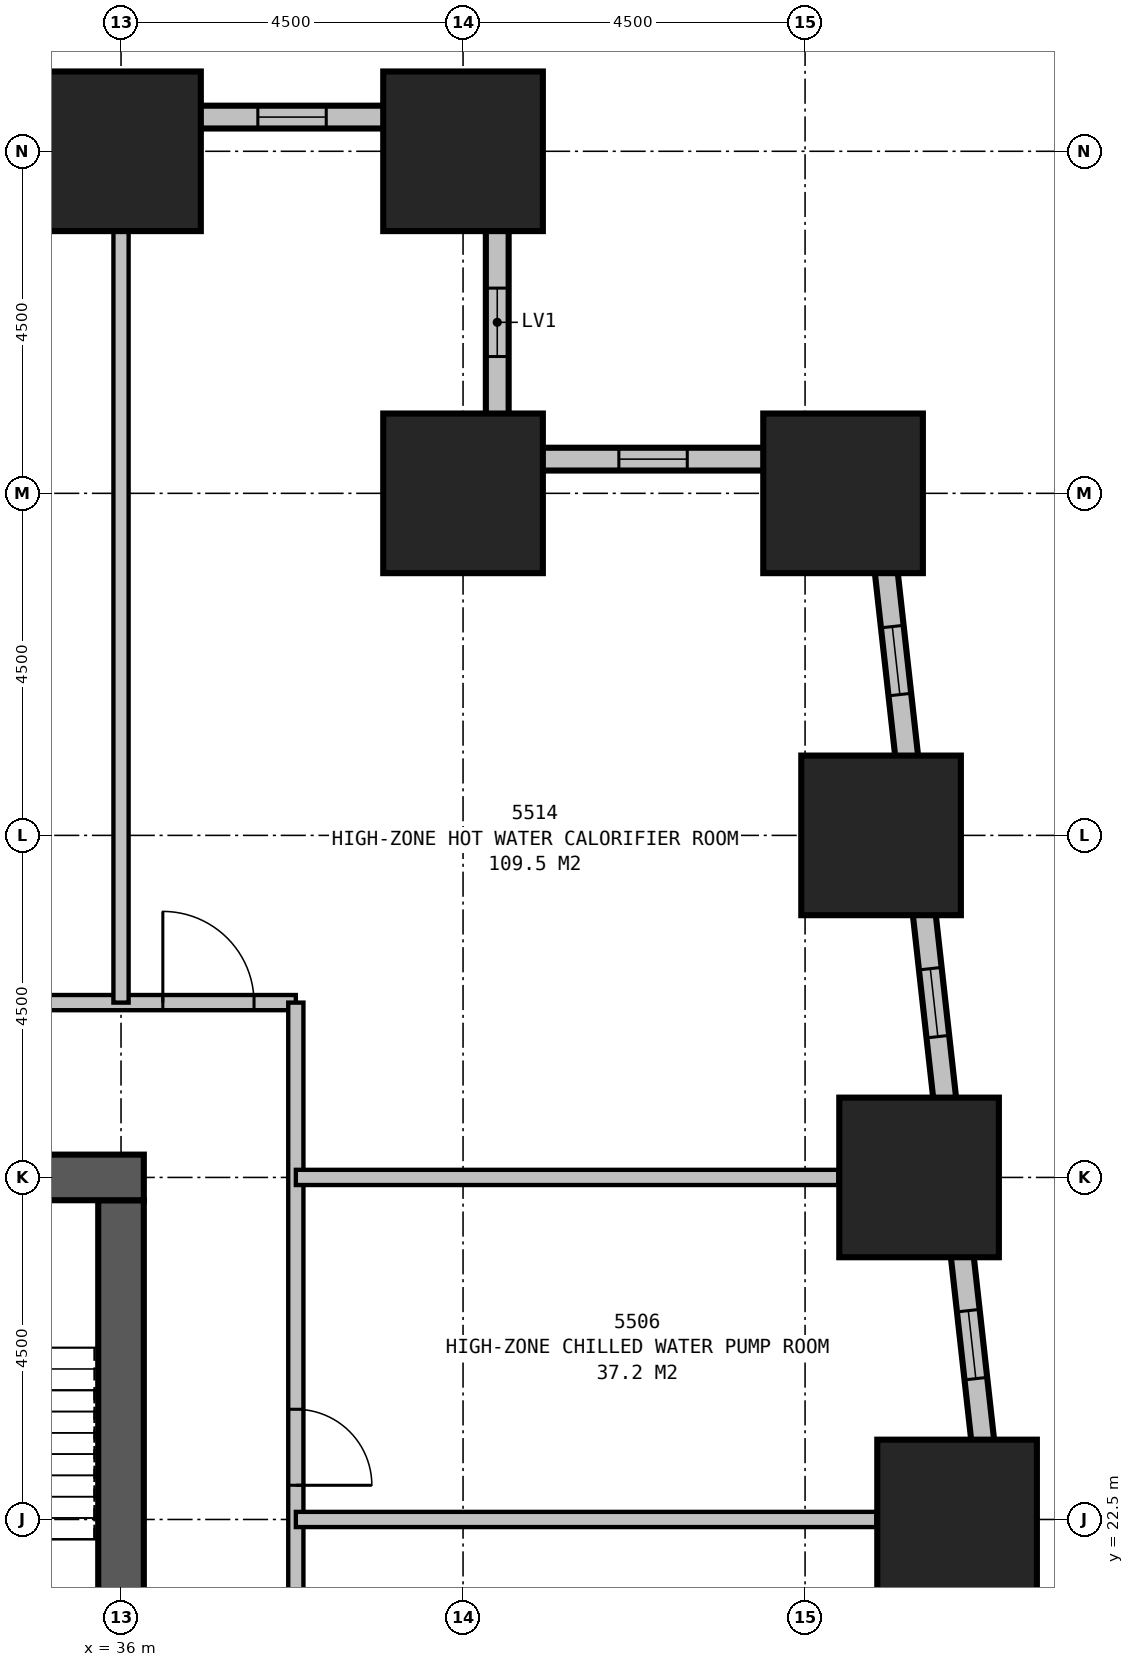
"""IFC4 building model, lengths in metres.
Left out: names, types, materials, properties, quantities, classifications, styles, units other than length and angle.
Written with IfcOpenShell. Run it as: python <this file> out.ifc"""

import sys

from ifc_helpers import new_model, si_unit, direction, frame, frame_2d, origin, origin_2d, place, context, subcontext, project, spatial, rectangle, extrude, element, fill, save


model = new_model("IFC4")
c1 = context("Model", 3, precision=1e-05, world=origin(), true_north=direction((0.0, 1.0)))
c2 = subcontext(c1, "Body", "Model", "MODEL_VIEW")
j1 = project(units=[si_unit("LENGTHUNIT", "METRE"), si_unit("PLANEANGLEUNIT", "RADIAN")], contexts=[c1])
p1 = place(None, origin())
s1 = spatial("IfcSite", under=j1, at=p1, CompositionType="ELEMENT")
p2 = place(p1, origin())
s2 = spatial("IfcBuilding", under=s1, at=p2, CompositionType="ELEMENT")
p3 = place(p2, frame((0.0, 0.0, 211.4)))
s3 = spatial("IfcBuildingStorey", under=s2, at=p3, CompositionType="ELEMENT", Elevation=211.4)
for number, where, z_axis, x_axis in (
    (1, (47.0, 22.5, 0.0), (0.0, 0.0, 1.0), (1.0, 0.0, 0.0)),
    (2, (46.5, 27.0, 0.0), (0.0, 0.0, 1.0), (1.0, 0.0, 0.0)),
    (3, (46.0, 31.5, 0.0), (0.0, 0.0, 1.0), (1.0, 0.0, 0.0)),
    (4, (45.5, 36.0, 0.0), (0.0, 0.0, 1.0), (1.0, 0.0, 0.0)),
    (5, (40.5, 36.0, 0.0), (0.0, 0.0, 1.0), (1.0, 0.0, 0.0)),
    (6, (40.5, 40.5, 0.0), (0.0, 0.0, 1.0), (1.0, 0.0, 0.0)),
    (7, (36.0, 40.5, 0.0), (0.0, 0.0, 1.0), (1.0, 0.0, 0.0)),
):
    element("IfcColumn", number, at=place(p3, frame(where, z_axis=z_axis, x_axis=x_axis)), inside=s3, PredefinedType="COLUMN", context=c2, shape_type="SweptSolid", body=[
        extrude(rectangle(XDim=2.1, YDim=2.1, at=origin_2d()), origin(), (0.0, 0.0, 1.0), 6.0),
    ])
p4 = place(p3, frame((36.3, 27.0, 0.0), z_axis=(0.0, 0.0, 1.0), x_axis=(-1.0, 0.0, 0.0)))
e8 = element("IfcWall", 8, at=p4, inside=s3, PredefinedType="SHEAR", context=c2, shape_type="SweptSolid", body=[
    extrude(rectangle(XDim=23.1, YDim=0.6, at=frame_2d((11.55, 0.0))), origin(), (0.0, 0.0, 1.0), 6.0),
])
p5 = place(p4, frame((17.05, 0.0, 0.0)))
e9 = element("IfcOpeningElement", 9, at=p5, cuts=e8, PredefinedType="OPENING", context=c2, shape_type="SweptSolid", body=[
    extrude(rectangle(XDim=1.0, YDim=2.1, at=frame_2d((0.5, 1.05))), frame((0.0, 0.31, 0.0), z_axis=(0.0, -1.0, 0.0), x_axis=(1.0, 0.0, 0.0)), (0.0, 0.0, 1.0), 0.62),
])
p6 = place(p4, frame((12.05, 0.0, 0.0)))
e10 = element("IfcOpeningElement", 10, at=p6, cuts=e8, PredefinedType="OPENING", context=c2, shape_type="SweptSolid", body=[
    extrude(rectangle(XDim=1.0, YDim=2.1, at=frame_2d((0.5, 1.05))), frame((0.0, 0.31, 0.0), z_axis=(0.0, -1.0, 0.0), x_axis=(1.0, 0.0, 0.0)), (0.0, 0.0, 1.0), 0.62),
])
p7 = place(p4, frame((7.05, 0.0, 0.0)))
e11 = element("IfcOpeningElement", 11, at=p7, cuts=e8, PredefinedType="OPENING", context=c2, shape_type="SweptSolid", body=[
    extrude(rectangle(XDim=1.0, YDim=2.1, at=frame_2d((0.5, 1.05))), frame((0.0, 0.31, 0.0), z_axis=(0.0, -1.0, 0.0), x_axis=(1.0, 0.0, 0.0)), (0.0, 0.0, 1.0), 0.62),
])
p8 = place(p3, frame((36.0, 20.0, 0.0), z_axis=(0.0, 0.0, 1.0), x_axis=(0.0, 1.0, 0.0)))
e12 = element("IfcWall", 12, at=p8, inside=s3, PredefinedType="SHEAR", context=c2, shape_type="SweptSolid", body=[
    extrude(rectangle(XDim=6.7, YDim=0.6, at=frame_2d((3.35, 0.0))), origin(), (0.0, 0.0, 1.0), 6.0),
])
p9 = place(p3, frame((49.519, 3.901, 0.0), z_axis=(0.0, 0.0, 1.0), x_axis=(-0.110429082637, 0.993884006164, 0.0)))
e13 = element("IfcWall", 13, at=p9, inside=s3, PredefinedType="STANDARD", context=c2, shape_type="SweptSolid", body=[
    extrude(rectangle(XDim=32.899, YDim=0.3, at=frame_2d((16.45, 0.0))), origin(), (0.0, 0.0, 1.0), 4.6),
])
p10 = place(p9, frame((2.467, 0.0, 0.5)))
e14 = element("IfcOpeningElement", 14, at=p10, cuts=e13, PredefinedType="OPENING", context=c2, shape_type="SweptSolid", body=[
    extrude(rectangle(XDim=0.9, YDim=1.2, at=frame_2d((0.45, 0.6))), frame((0.0, 0.16, 0.0), z_axis=(0.0, -1.0, 0.0), x_axis=(1.0, 0.0, 0.0)), (0.0, 0.0, 1.0), 0.32),
])
p11 = place(p9, frame((6.995, 0.0, 0.5)))
e15 = element("IfcOpeningElement", 15, at=p11, cuts=e13, PredefinedType="OPENING", context=c2, shape_type="SweptSolid", body=[
    extrude(rectangle(XDim=0.9, YDim=1.2, at=frame_2d((0.45, 0.6))), frame((0.0, 0.16, 0.0), z_axis=(0.0, -1.0, 0.0), x_axis=(1.0, 0.0, 0.0)), (0.0, 0.0, 1.0), 0.32),
])
p12 = place(p9, frame((11.522, 0.0, 0.5)))
e16 = element("IfcOpeningElement", 16, at=p12, cuts=e13, PredefinedType="OPENING", context=c2, shape_type="SweptSolid", body=[
    extrude(rectangle(XDim=0.9, YDim=1.2, at=frame_2d((0.45, 0.6))), frame((0.0, 0.16, 0.0), z_axis=(0.0, -1.0, 0.0), x_axis=(1.0, 0.0, 0.0)), (0.0, 0.0, 1.0), 0.32),
])
p13 = place(p9, frame((16.05, 0.0, 0.5)))
e17 = element("IfcOpeningElement", 17, at=p13, cuts=e13, PredefinedType="OPENING", context=c2, shape_type="SweptSolid", body=[
    extrude(rectangle(XDim=0.9, YDim=1.2, at=frame_2d((0.45, 0.6))), frame((0.0, 0.16, 0.0), z_axis=(0.0, -1.0, 0.0), x_axis=(1.0, 0.0, 0.0)), (0.0, 0.0, 1.0), 0.32),
])
p14 = place(p9, frame((20.578, 0.0, 0.5)))
e18 = element("IfcOpeningElement", 18, at=p14, cuts=e13, PredefinedType="OPENING", context=c2, shape_type="SweptSolid", body=[
    extrude(rectangle(XDim=0.9, YDim=1.2, at=frame_2d((0.45, 0.6))), frame((0.0, 0.16, 0.0), z_axis=(0.0, -1.0, 0.0), x_axis=(1.0, 0.0, 0.0)), (0.0, 0.0, 1.0), 0.32),
])
p15 = place(p9, frame((25.105, 0.0, 0.5)))
e19 = element("IfcOpeningElement", 19, at=p15, cuts=e13, PredefinedType="OPENING", context=c2, shape_type="SweptSolid", body=[
    extrude(rectangle(XDim=0.9, YDim=1.2, at=frame_2d((0.45, 0.6))), frame((0.0, 0.16, 0.0), z_axis=(0.0, -1.0, 0.0), x_axis=(1.0, 0.0, 0.0)), (0.0, 0.0, 1.0), 0.32),
])
p16 = place(p9, frame((29.633, 0.0, 0.5)))
e20 = element("IfcOpeningElement", 20, at=p16, cuts=e13, PredefinedType="OPENING", context=c2, shape_type="SweptSolid", body=[
    extrude(rectangle(XDim=0.9, YDim=1.2, at=frame_2d((0.45, 0.6))), frame((0.0, 0.16, 0.0), z_axis=(0.0, -1.0, 0.0), x_axis=(1.0, 0.0, 0.0)), (0.0, 0.0, 1.0), 0.32),
])
p17 = place(p3, frame((46.053, 36.45, 0.0), z_axis=(0.0, 0.0, 1.0), x_axis=(-1.0, 0.0, 0.0)))
e21 = element("IfcWall", 21, at=p17, inside=s3, PredefinedType="STANDARD", context=c2, shape_type="SweptSolid", body=[
    extrude(rectangle(XDim=5.253, YDim=0.3, at=frame_2d((2.626, 0.0))), origin(), (0.0, 0.0, 1.0), 4.6),
])
p18 = place(p17, frame((2.603, 0.0, 0.5)))
e22 = element("IfcOpeningElement", 22, at=p18, cuts=e21, PredefinedType="OPENING", context=c2, shape_type="SweptSolid", body=[
    extrude(rectangle(XDim=0.9, YDim=1.2, at=frame_2d((0.45, 0.6))), frame((0.0, 0.16, 0.0), z_axis=(0.0, -1.0, 0.0), x_axis=(1.0, 0.0, 0.0)), (0.0, 0.0, 1.0), 0.32),
])
p19 = place(p3, frame((40.95, 36.3, 0.0), z_axis=(0.0, 0.0, 1.0), x_axis=(0.0, 1.0, 0.0)))
e23 = element("IfcWall", 23, at=p19, inside=s3, PredefinedType="STANDARD", context=c2, shape_type="SweptSolid", body=[
    extrude(rectangle(XDim=4.8, YDim=0.3, at=frame_2d((2.4, 0.0))), origin(), (0.0, 0.0, 1.0), 4.6),
])
p20 = place(p19, frame((1.5, 0.0, 0.5)))
e24 = element("IfcOpeningElement", 24, at=p20, cuts=e23, PredefinedType="OPENING", context=c2, shape_type="SweptSolid", body=[
    extrude(rectangle(XDim=0.9, YDim=1.2, at=frame_2d((0.45, 0.6))), frame((0.0, 0.16, 0.0), z_axis=(0.0, -1.0, 0.0), x_axis=(1.0, 0.0, 0.0)), (0.0, 0.0, 1.0), 0.32),
])
p21 = place(p3, frame((41.1, 40.95, 0.0), z_axis=(0.0, 0.0, 1.0), x_axis=(-1.0, 0.0, 0.0)))
e25 = element("IfcWall", 25, at=p21, inside=s3, PredefinedType="STANDARD", context=c2, shape_type="SweptSolid", body=[
    extrude(rectangle(XDim=32.7, YDim=0.3, at=frame_2d((16.35, 0.0))), origin(), (0.0, 0.0, 1.0), 4.6),
])
p22 = place(p21, frame((2.4, 0.0, 0.5)))
e26 = element("IfcOpeningElement", 26, at=p22, cuts=e25, PredefinedType="OPENING", context=c2, shape_type="SweptSolid", body=[
    extrude(rectangle(XDim=0.9, YDim=1.2, at=frame_2d((0.45, 0.6))), frame((0.0, 0.16, 0.0), z_axis=(0.0, -1.0, 0.0), x_axis=(1.0, 0.0, 0.0)), (0.0, 0.0, 1.0), 0.32),
])
p23 = place(p21, frame((6.9, 0.0, 0.5)))
e27 = element("IfcOpeningElement", 27, at=p23, cuts=e25, PredefinedType="OPENING", context=c2, shape_type="SweptSolid", body=[
    extrude(rectangle(XDim=0.9, YDim=1.2, at=frame_2d((0.45, 0.6))), frame((0.0, 0.16, 0.0), z_axis=(0.0, -1.0, 0.0), x_axis=(1.0, 0.0, 0.0)), (0.0, 0.0, 1.0), 0.32),
])
p24 = place(p21, frame((11.4, 0.0, 0.5)))
e28 = element("IfcOpeningElement", 28, at=p24, cuts=e25, PredefinedType="OPENING", context=c2, shape_type="SweptSolid", body=[
    extrude(rectangle(XDim=0.9, YDim=1.2, at=frame_2d((0.45, 0.6))), frame((0.0, 0.16, 0.0), z_axis=(0.0, -1.0, 0.0), x_axis=(1.0, 0.0, 0.0)), (0.0, 0.0, 1.0), 0.32),
])
p25 = place(p21, frame((15.9, 0.0, 0.5)))
e29 = element("IfcOpeningElement", 29, at=p25, cuts=e25, PredefinedType="OPENING", context=c2, shape_type="SweptSolid", body=[
    extrude(rectangle(XDim=0.9, YDim=1.2, at=frame_2d((0.45, 0.6))), frame((0.0, 0.16, 0.0), z_axis=(0.0, -1.0, 0.0), x_axis=(1.0, 0.0, 0.0)), (0.0, 0.0, 1.0), 0.32),
])
p26 = place(p21, frame((20.4, 0.0, 0.5)))
e30 = element("IfcOpeningElement", 30, at=p26, cuts=e25, PredefinedType="OPENING", context=c2, shape_type="SweptSolid", body=[
    extrude(rectangle(XDim=0.9, YDim=1.2, at=frame_2d((0.45, 0.6))), frame((0.0, 0.16, 0.0), z_axis=(0.0, -1.0, 0.0), x_axis=(1.0, 0.0, 0.0)), (0.0, 0.0, 1.0), 0.32),
])
p27 = place(p21, frame((24.9, 0.0, 0.5)))
e31 = element("IfcOpeningElement", 31, at=p27, cuts=e25, PredefinedType="OPENING", context=c2, shape_type="SweptSolid", body=[
    extrude(rectangle(XDim=0.9, YDim=1.2, at=frame_2d((0.45, 0.6))), frame((0.0, 0.16, 0.0), z_axis=(0.0, -1.0, 0.0), x_axis=(1.0, 0.0, 0.0)), (0.0, 0.0, 1.0), 0.32),
])
p28 = place(p21, frame((29.4, 0.0, 0.5)))
e32 = element("IfcOpeningElement", 32, at=p28, cuts=e25, PredefinedType="OPENING", context=c2, shape_type="SweptSolid", body=[
    extrude(rectangle(XDim=0.9, YDim=1.2, at=frame_2d((0.45, 0.6))), frame((0.0, 0.16, 0.0), z_axis=(0.0, -1.0, 0.0), x_axis=(1.0, 0.0, 0.0)), (0.0, 0.0, 1.0), 0.32),
])
p29 = place(p3, frame((38.3, 11.2, 0.0), z_axis=(0.0, 0.0, 1.0), x_axis=(0.0, 1.0, 0.0)))
e33 = element("IfcWall", 33, at=p29, inside=s3, PredefinedType="PARTITIONING", context=c2, shape_type="SweptSolid", body=[
    extrude(rectangle(XDim=18.1, YDim=0.2, at=frame_2d((9.05, 0.0))), origin(), (0.0, 0.0, 1.0), 5.75),
])
p30 = place(p29, frame((3.95, 0.0, 0.0), z_axis=(0.0, 0.0, 1.0), x_axis=(-1.0, 0.0, 0.0)))
e34 = element("IfcOpeningElement", 34, at=p30, cuts=e33, PredefinedType="OPENING", context=c2, shape_type="SweptSolid", body=[
    extrude(rectangle(XDim=1.2, YDim=2.1, at=frame_2d((0.6, 1.05))), frame((0.0, 0.11, 0.0), z_axis=(0.0, -1.0, 0.0), x_axis=(1.0, 0.0, 0.0)), (0.0, 0.0, 1.0), 0.22),
])
p31 = place(p29, frame((12.75, 0.0, 0.0), z_axis=(0.0, 0.0, 1.0), x_axis=(-1.0, 0.0, 0.0)))
e35 = element("IfcOpeningElement", 35, at=p31, cuts=e33, PredefinedType="OPENING", context=c2, shape_type="SweptSolid", body=[
    extrude(rectangle(XDim=1.0, YDim=2.1, at=frame_2d((0.5, 1.05))), frame((0.0, 0.11, 0.0), z_axis=(0.0, -1.0, 0.0), x_axis=(1.0, 0.0, 0.0)), (0.0, 0.0, 1.0), 0.22),
])
p32 = place(p3, frame((11.2, 29.3, 0.0), z_axis=(0.0, 0.0, 1.0), x_axis=(1.0, 0.0, 0.0)))
e36 = element("IfcWall", 36, at=p32, inside=s3, PredefinedType="PARTITIONING", context=c2, shape_type="SweptSolid", body=[
    extrude(rectangle(XDim=27.1, YDim=0.2, at=frame_2d((13.55, 0.0))), origin(), (0.0, 0.0, 1.0), 5.75),
])
p33 = place(p32, frame((3.15, 0.0, 0.0)))
e37 = element("IfcOpeningElement", 37, at=p33, cuts=e36, PredefinedType="OPENING", context=c2, shape_type="SweptSolid", body=[
    extrude(rectangle(XDim=1.2, YDim=2.1, at=frame_2d((0.6, 1.05))), frame((0.0, 0.11, 0.0), z_axis=(0.0, -1.0, 0.0), x_axis=(1.0, 0.0, 0.0)), (0.0, 0.0, 1.0), 0.22),
])
p34 = place(p32, frame((16.25, 0.0, 0.0)))
e38 = element("IfcOpeningElement", 38, at=p34, cuts=e36, PredefinedType="OPENING", context=c2, shape_type="SweptSolid", body=[
    extrude(rectangle(XDim=1.2, YDim=2.1, at=frame_2d((0.6, 1.05))), frame((0.0, 0.11, 0.0), z_axis=(0.0, -1.0, 0.0), x_axis=(1.0, 0.0, 0.0)), (0.0, 0.0, 1.0), 0.22),
])
p35 = place(p32, frame((0.25, 0.0, 0.0)))
e39 = element("IfcOpeningElement", 39, at=p35, cuts=e36, PredefinedType="OPENING", context=c2, shape_type="SweptSolid", body=[
    extrude(rectangle(XDim=1.2, YDim=2.1, at=frame_2d((0.6, 1.05))), frame((0.0, 0.11, 0.0), z_axis=(0.0, -1.0, 0.0), x_axis=(1.0, 0.0, 0.0)), (0.0, 0.0, 1.0), 0.22),
])
p36 = place(p32, frame((25.35, 0.0, 0.0)))
e40 = element("IfcOpeningElement", 40, at=p36, cuts=e36, PredefinedType="OPENING", context=c2, shape_type="SweptSolid", body=[
    extrude(rectangle(XDim=1.2, YDim=2.1, at=frame_2d((0.6, 1.05))), frame((0.0, 0.11, 0.0), z_axis=(0.0, -1.0, 0.0), x_axis=(1.0, 0.0, 0.0)), (0.0, 0.0, 1.0), 0.22),
])
p37 = place(p3, frame((38.3, 22.5, 0.0), z_axis=(0.0, 0.0, 1.0), x_axis=(1.0, 0.0, 0.0)))
e41 = element("IfcWall", 41, at=p37, inside=s3, PredefinedType="PARTITIONING", context=c2, shape_type="SweptSolid", body=[
    extrude(rectangle(XDim=7.639, YDim=0.2, at=frame_2d((3.82, 0.0))), origin(), (0.0, 0.0, 1.0), 4.75),
])
p38 = place(p3, frame((38.3, 27.0, 0.0), z_axis=(0.0, 0.0, 1.0), x_axis=(1.0, 0.0, 0.0)))
e42 = element("IfcWall", 42, at=p38, inside=s3, PredefinedType="PARTITIONING", context=c2, shape_type="SweptSolid", body=[
    extrude(rectangle(XDim=7.139, YDim=0.2, at=frame_2d((3.57, 0.0))), origin(), (0.0, 0.0, 1.0), 4.45),
])
p39 = place(p3, frame((36.0, 29.3, 0.0), z_axis=(0.0, 0.0, 1.0), x_axis=(0.0, 1.0, 0.0)))
e43 = element("IfcWall", 43, at=p39, inside=s3, PredefinedType="PARTITIONING", context=c2, shape_type="SweptSolid", body=[
    extrude(rectangle(XDim=10.15, YDim=0.2, at=frame_2d((5.075, 0.0))), origin(), (0.0, 0.0, 1.0), 4.75),
])
p40 = place(p14, origin())
e44 = element("IfcWindow", 44, at=p40, inside=s3, PartitioningType="SINGLE_PANEL", PredefinedType="USERDEFINED", context=c2, shape_type="SweptSolid", body=[
    extrude(rectangle(XDim=0.9, YDim=1.2, at=frame_2d((0.45, 0.6))), frame((0.0, 0.03, 0.0), z_axis=(0.0, -1.0, 0.0), x_axis=(1.0, 0.0, 0.0)), (0.0, 0.0, 1.0), 0.06),
])
fill(e18, e44)
p41 = place(p15, origin())
e45 = element("IfcWindow", 45, at=p41, inside=s3, PartitioningType="SINGLE_PANEL", PredefinedType="USERDEFINED", context=c2, shape_type="SweptSolid", body=[
    extrude(rectangle(XDim=0.9, YDim=1.2, at=frame_2d((0.45, 0.6))), frame((0.0, 0.03, 0.0), z_axis=(0.0, -1.0, 0.0), x_axis=(1.0, 0.0, 0.0)), (0.0, 0.0, 1.0), 0.06),
])
fill(e19, e45)
p42 = place(p16, origin())
e46 = element("IfcWindow", 46, at=p42, inside=s3, PartitioningType="SINGLE_PANEL", PredefinedType="USERDEFINED", context=c2, shape_type="SweptSolid", body=[
    extrude(rectangle(XDim=0.9, YDim=1.2, at=frame_2d((0.45, 0.6))), frame((0.0, 0.03, 0.0), z_axis=(0.0, -1.0, 0.0), x_axis=(1.0, 0.0, 0.0)), (0.0, 0.0, 1.0), 0.06),
])
fill(e20, e46)
p43 = place(p18, origin())
e47 = element("IfcWindow", 47, at=p43, inside=s3, PartitioningType="SINGLE_PANEL", PredefinedType="USERDEFINED", context=c2, shape_type="SweptSolid", body=[
    extrude(rectangle(XDim=0.9, YDim=1.2, at=frame_2d((0.45, 0.6))), frame((0.0, 0.03, 0.0), z_axis=(0.0, -1.0, 0.0), x_axis=(1.0, 0.0, 0.0)), (0.0, 0.0, 1.0), 0.06),
])
fill(e22, e47)
p44 = place(p20, origin())
e48 = element("IfcWindow", 48, at=p44, inside=s3, PartitioningType="SINGLE_PANEL", PredefinedType="USERDEFINED", context=c2, shape_type="SweptSolid", body=[
    extrude(rectangle(XDim=0.9, YDim=1.2, at=frame_2d((0.45, 0.6))), frame((0.0, 0.03, 0.0), z_axis=(0.0, -1.0, 0.0), x_axis=(1.0, 0.0, 0.0)), (0.0, 0.0, 1.0), 0.06),
])
fill(e24, e48)
p45 = place(p22, origin())
e49 = element("IfcWindow", 49, at=p45, inside=s3, PartitioningType="SINGLE_PANEL", PredefinedType="USERDEFINED", context=c2, shape_type="SweptSolid", body=[
    extrude(rectangle(XDim=0.9, YDim=1.2, at=frame_2d((0.45, 0.6))), frame((0.0, 0.03, 0.0), z_axis=(0.0, -1.0, 0.0), x_axis=(1.0, 0.0, 0.0)), (0.0, 0.0, 1.0), 0.06),
])
fill(e26, e49)
p46 = place(p31, origin())
e50 = element("IfcDoor", 50, at=p46, inside=s3, OperationType="SINGLE_SWING_RIGHT", PredefinedType="DOOR", context=c2, shape_type="SweptSolid", body=[
    extrude(rectangle(XDim=1.0, YDim=2.1, at=frame_2d((0.5, 1.05))), frame((0.0, 0.025, 0.0), z_axis=(0.0, -1.0, 0.0), x_axis=(1.0, 0.0, 0.0)), (0.0, 0.0, 1.0), 0.05),
])
fill(e35, e50)
p47 = place(p36, origin())
e51 = element("IfcDoor", 51, at=p47, inside=s3, OperationType="SINGLE_SWING_LEFT", PredefinedType="DOOR", context=c2, shape_type="SweptSolid", body=[
    extrude(rectangle(XDim=1.2, YDim=2.1, at=frame_2d((0.6, 1.05))), frame((0.0, 0.025, 0.0), z_axis=(0.0, -1.0, 0.0), x_axis=(1.0, 0.0, 0.0)), (0.0, 0.0, 1.0), 0.05),
])
fill(e40, e51)
save(model, sys.argv[1])
